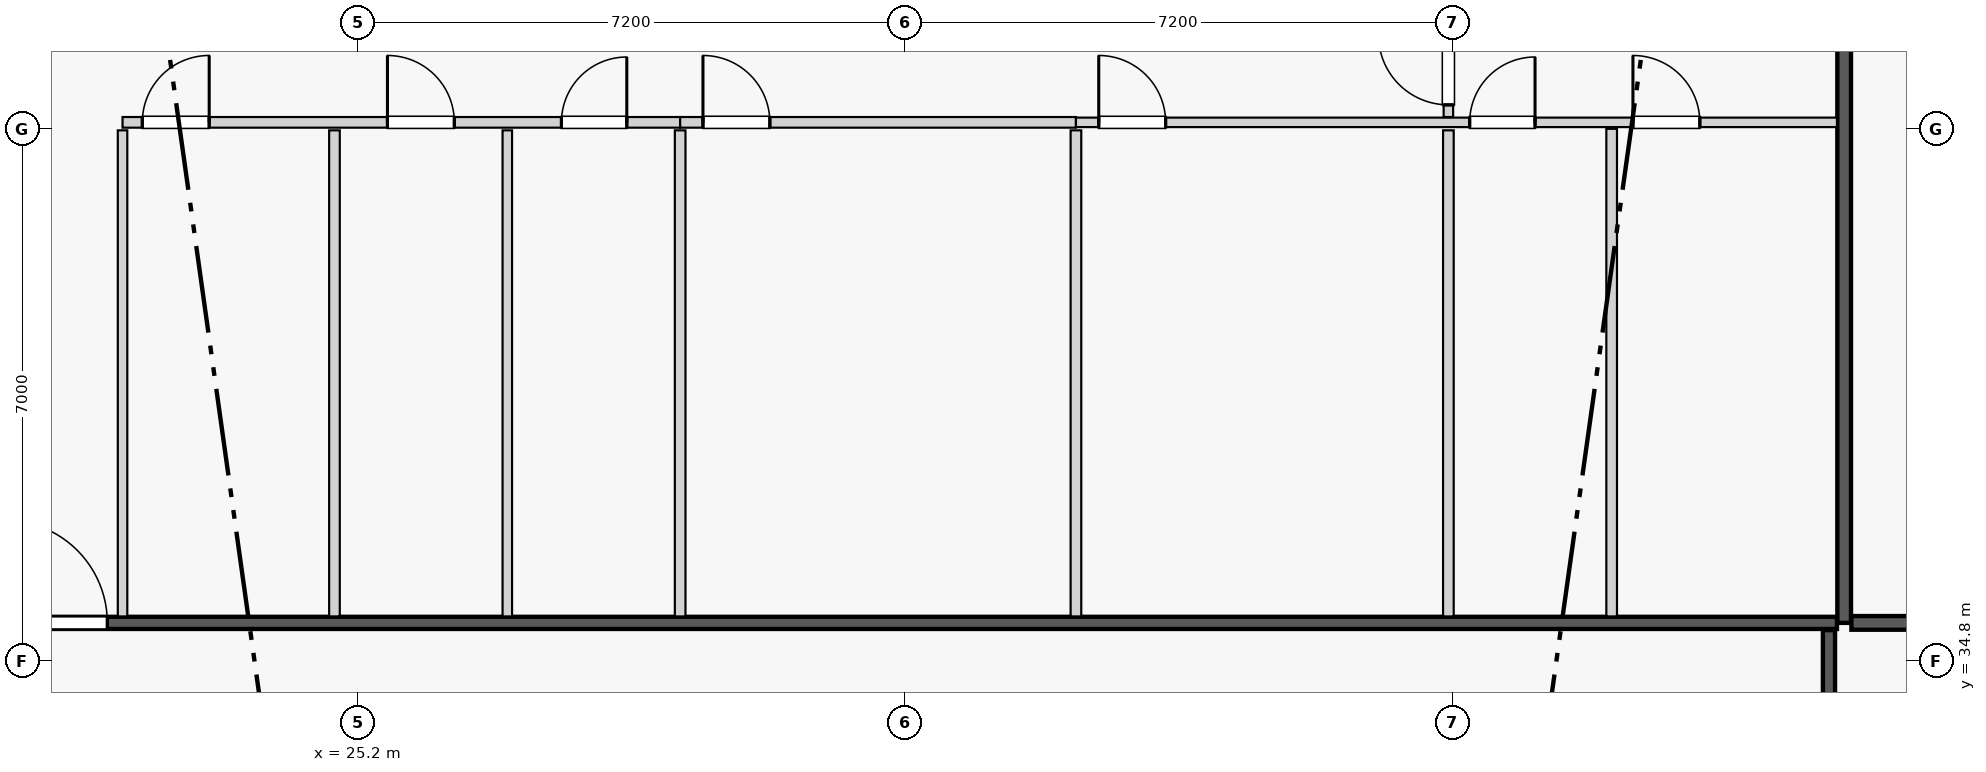
"""IFC4 building model, lengths in metres.
Left out: names, types, materials, properties, quantities, classifications, styles, units other than length and angle.
Written with IfcOpenShell. Run it as: python <this file> out.ifc"""

import sys

from ifc_helpers import new_model, si_unit, direction, frame, frame_2d, origin, place, context, subcontext, project, spatial, rectangle, extrude, element, fill, save


model = new_model("IFC4")
c1 = context("Model", 3, precision=1e-05, world=origin(), true_north=direction((0.0, 1.0)))
c2 = subcontext(c1, "Body", "Model", "MODEL_VIEW")
j1 = project(units=[si_unit("LENGTHUNIT", "METRE"), si_unit("PLANEANGLEUNIT", "RADIAN")], contexts=[c1])
p1 = place(None, origin())
s1 = spatial("IfcSite", under=j1, at=p1, CompositionType="ELEMENT")
p2 = place(p1, origin())
s2 = spatial("IfcBuilding", under=s1, at=p2, CompositionType="ELEMENT")
p3 = place(p2, frame((0.0, 0.0, 112.6)))
s3 = spatial("IfcBuildingStorey", under=s2, at=p3, CompositionType="ELEMENT", Elevation=112.6)
p4 = place(p3, frame((44.75, 35.3, 0.0), z_axis=(0.0, 0.0, 1.0), x_axis=(0.0, 1.0, 0.0)))
e1 = element("IfcWall", 1, at=p4, inside=s3, PredefinedType="PARTITIONING", context=c2, shape_type="SweptSolid", body=[
    extrude(rectangle(XDim=12.195, YDim=0.18, at=frame_2d((6.098, 0.0))), origin(), (0.0, 0.0, 1.0), 3.34),
])
p5 = place(p3, frame((20.145, 35.3, 0.0), z_axis=(0.0, 0.0, 1.0), x_axis=(1.0, 0.0, 0.0)))
e2 = element("IfcWall", 2, at=p5, inside=s3, PredefinedType="PARTITIONING", context=c2, shape_type="SweptSolid", body=[
    extrude(rectangle(XDim=24.51, YDim=0.16, at=frame_2d((12.255, 0.0))), origin(), (0.0, 0.0, 1.0), 3.34),
])
p6 = place(p5, frame((0.405, 0.0, 0.0)))
e3 = element("IfcOpeningElement", 3, at=p6, cuts=e2, PredefinedType="OPENING", context=c2, shape_type="SweptSolid", body=[
    extrude(rectangle(XDim=1.35, YDim=2.35, at=frame_2d((0.675, 1.175))), frame((0.0, 0.09, 0.0), z_axis=(0.0, -1.0, 0.0), x_axis=(1.0, 0.0, 0.0)), (0.0, 0.0, 1.0), 0.18),
])
p7 = place(p3, frame((22.1, 35.385, 0.0), z_axis=(0.0, 0.0, 1.0), x_axis=(0.0, 1.0, 0.0)))
e4 = element("IfcWall", 4, at=p7, inside=s3, PredefinedType="PARTITIONING", context=c2, shape_type="SweptSolid", body=[
    extrude(rectangle(XDim=6.395, YDim=0.125, at=frame_2d((3.198, 0.0))), origin(), (0.0, 0.0, 1.0), 2.722),
])
p8 = place(p3, frame((22.1, 41.885, 0.0), z_axis=(0.0, 0.0, 1.0), x_axis=(1.0, 0.0, 0.0)))
e5 = element("IfcWall", 5, at=p8, inside=s3, PredefinedType="PLUMBINGWALL", context=c2, shape_type="SweptSolid", body=[
    extrude(rectangle(XDim=7.336, YDim=0.14, at=frame_2d((3.668, 0.0))), origin(), (0.0, 0.0, 1.0), 3.34),
])
p9 = place(p8, frame((5.774, 0.0, 0.0)))
e6 = element("IfcOpeningElement", 6, at=p9, cuts=e5, PredefinedType="OPENING", context=c2, shape_type="SweptSolid", body=[
    extrude(rectangle(XDim=0.86, YDim=2.1, at=frame_2d((0.43, 1.05))), frame((0.0, 0.08, 0.0), z_axis=(0.0, -1.0, 0.0), x_axis=(1.0, 0.0, 0.0)), (0.0, 0.0, 1.0), 0.16),
])
p10 = place(p8, frame((0.26, 0.0, 0.0)))
e7 = element("IfcOpeningElement", 7, at=p10, cuts=e5, PredefinedType="OPENING", context=c2, shape_type="SweptSolid", body=[
    extrude(rectangle(XDim=0.88, YDim=2.15, at=frame_2d((0.44, 1.075))), frame((0.0, 0.08, 0.0), z_axis=(0.0, -1.0, 0.0), x_axis=(1.0, 0.0, 0.0)), (0.0, 0.0, 1.0), 0.16),
])
p11 = place(p8, frame((3.485, 0.0, 0.0)))
e8 = element("IfcOpeningElement", 8, at=p11, cuts=e5, PredefinedType="OPENING", context=c2, shape_type="SweptSolid", body=[
    extrude(rectangle(XDim=0.88, YDim=2.15, at=frame_2d((0.44, 1.075))), frame((0.0, 0.08, 0.0), z_axis=(0.0, -1.0, 0.0), x_axis=(1.0, 0.0, 0.0)), (0.0, 0.0, 1.0), 0.16),
])
p12 = place(p3, frame((29.436, 41.885, 0.0), z_axis=(0.0, 0.0, 1.0), x_axis=(1.0, 0.0, 0.0)))
e9 = element("IfcWall", 9, at=p12, inside=s3, PredefinedType="PLUMBINGWALL", context=c2, shape_type="SweptSolid", body=[
    extrude(rectangle(XDim=5.207, YDim=0.14, at=frame_2d((2.604, 0.0))), origin(), (0.0, 0.0, 1.0), 3.34),
])
p13 = place(p12, frame((0.3, 0.0, 0.0)))
e10 = element("IfcOpeningElement", 10, at=p13, cuts=e9, PredefinedType="OPENING", context=c2, shape_type="SweptSolid", body=[
    extrude(rectangle(XDim=0.88, YDim=2.15, at=frame_2d((0.44, 1.075))), frame((0.0, 0.08, 0.0), z_axis=(0.0, -1.0, 0.0), x_axis=(1.0, 0.0, 0.0)), (0.0, 0.0, 1.0), 0.16),
])
p14 = place(p3, frame((34.643, 41.885, 0.0), z_axis=(0.0, 0.0, 1.0), x_axis=(1.0, 0.0, 0.0)))
e11 = element("IfcWall", 11, at=p14, inside=s3, PredefinedType="PARTITIONING", context=c2, shape_type="SweptSolid", body=[
    extrude(rectangle(XDim=10.012, YDim=0.125, at=frame_2d((5.006, 0.0))), origin(), (0.0, 0.0, 1.0), 3.34),
])
p15 = place(p14, frame((5.18, 0.0, 0.0)))
e12 = element("IfcOpeningElement", 12, at=p15, cuts=e11, PredefinedType="OPENING", context=c2, shape_type="SweptSolid", body=[
    extrude(rectangle(XDim=0.86, YDim=2.1, at=frame_2d((0.43, 1.05))), frame((0.0, 0.073, 0.0), z_axis=(0.0, -1.0, 0.0), x_axis=(1.0, 0.0, 0.0)), (0.0, 0.0, 1.0), 0.145),
])
p16 = place(p14, frame((7.328, 0.0, 0.0)))
e13 = element("IfcOpeningElement", 13, at=p16, cuts=e11, PredefinedType="OPENING", context=c2, shape_type="SweptSolid", body=[
    extrude(rectangle(XDim=0.88, YDim=2.15, at=frame_2d((0.44, 1.075))), frame((0.0, 0.073, 0.0), z_axis=(0.0, -1.0, 0.0), x_axis=(1.0, 0.0, 0.0)), (0.0, 0.0, 1.0), 0.145),
])
p17 = place(p14, frame((0.3, 0.0, 0.0)))
e14 = element("IfcOpeningElement", 14, at=p17, cuts=e11, PredefinedType="OPENING", context=c2, shape_type="SweptSolid", body=[
    extrude(rectangle(XDim=0.88, YDim=2.15, at=frame_2d((0.44, 1.075))), frame((0.0, 0.073, 0.0), z_axis=(0.0, -1.0, 0.0), x_axis=(1.0, 0.0, 0.0)), (0.0, 0.0, 1.0), 0.145),
])
p18 = place(p3, frame((24.888, 35.385, 0.0), z_axis=(0.0, 0.0, 1.0), x_axis=(0.0, 1.0, 0.0)))
e15 = element("IfcWall", 15, at=p18, inside=s3, PredefinedType="PLUMBINGWALL", context=c2, shape_type="SweptSolid", body=[
    extrude(rectangle(XDim=6.395, YDim=0.14, at=frame_2d((3.198, 0.0))), origin(), (0.0, 0.0, 1.0), 3.34),
])
p19 = place(p3, frame((27.162, 35.385, 0.0), z_axis=(0.0, 0.0, 1.0), x_axis=(0.0, 1.0, 0.0)))
e16 = element("IfcWall", 16, at=p19, inside=s3, PredefinedType="PARTITIONING", context=c2, shape_type="SweptSolid", body=[
    extrude(rectangle(XDim=6.395, YDim=0.125, at=frame_2d((3.198, 0.0))), origin(), (0.0, 0.0, 1.0), 3.34),
])
p20 = place(p3, frame((39.543, 41.955, 0.0), z_axis=(0.0, 0.0, 1.0), x_axis=(0.0, 1.0, 0.0)))
e17 = element("IfcWall", 17, at=p20, inside=s3, PredefinedType="PARTITIONING", context=c2, shape_type="SweptSolid", body=[
    extrude(rectangle(XDim=1.33, YDim=0.125, at=frame_2d((0.665, 0.0))), origin(), (0.0, 0.0, 1.0), 3.34),
])
p21 = place(p20, frame((0.16, 0.0, 0.0)))
e18 = element("IfcOpeningElement", 18, at=p21, cuts=e17, PredefinedType="OPENING", context=c2, shape_type="SweptSolid", body=[
    extrude(rectangle(XDim=0.92, YDim=2.15, at=frame_2d((0.46, 1.075))), frame((0.0, 0.073, 0.0), z_axis=(0.0, -1.0, 0.0), x_axis=(1.0, 0.0, 0.0)), (0.0, 0.0, 1.0), 0.145),
])
for number, where, z_axis, x_axis in (
    (19, (29.436, 35.385, 0.0), (0.0, 0.0, 1.0), (0.0, 1.0, 0.0)),
    (20, (34.643, 35.385, 0.0), (0.0, 0.0, 1.0), (0.0, 1.0, 0.0)),
    (21, (39.543, 35.385, 0.0), (0.0, 0.0, 1.0), (0.0, 1.0, 0.0)),
):
    element("IfcWall", number, at=place(p3, frame(where, z_axis=z_axis, x_axis=x_axis)), inside=s3, PredefinedType="PLUMBINGWALL", context=c2, shape_type="SweptSolid", body=[
        extrude(rectangle(XDim=6.395, YDim=0.14, at=frame_2d((3.198, 0.0))), origin(), (0.0, 0.0, 1.0), 3.34),
    ])
p22 = place(p3, frame((41.691, 35.385, 0.0), z_axis=(0.0, 0.0, 1.0), x_axis=(0.0, 1.0, 0.0)))
e22 = element("IfcWall", 22, at=p22, inside=s3, PredefinedType="PLUMBINGWALL", context=c2, shape_type="SweptSolid", body=[
    extrude(rectangle(XDim=6.415, YDim=0.14, at=frame_2d((3.208, 0.0))), origin(), (0.0, 0.0, 1.0), 2.722),
])
p23 = place(p3, frame((44.845, 35.3, 0.0), z_axis=(0.0, 0.0, 1.0), x_axis=(1.0, 0.0, 0.0)))
e23 = element("IfcWall", 23, at=p23, inside=s3, PredefinedType="PARTITIONING", context=c2, shape_type="SweptSolid", body=[
    extrude(rectangle(XDim=7.669, YDim=0.18, at=frame_2d((3.834, 0.0))), origin(), (0.0, 0.0, 1.0), 3.34),
])
p24 = place(p3, frame((44.55, 16.595, 0.0), z_axis=(0.0, 0.0, 1.0), x_axis=(0.0, 1.0, 0.0)))
e24 = element("IfcWall", 24, at=p24, inside=s3, PredefinedType="PARTITIONING", context=c2, shape_type="SweptSolid", body=[
    extrude(rectangle(XDim=18.61, YDim=0.16, at=frame_2d((9.305, 0.0))), origin(), (0.0, 0.0, 1.0), 3.34),
])
p25 = place(p24, frame((0.45, 0.0, 0.0)))
e25 = element("IfcOpeningElement", 25, at=p25, cuts=e24, PredefinedType="OPENING", context=c2, shape_type="SweptSolid", body=[
    extrude(rectangle(XDim=1.02, YDim=2.25, at=frame_2d((0.51, 1.125))), frame((0.0, 0.09, 0.0), z_axis=(0.0, -1.0, 0.0), x_axis=(1.0, 0.0, 0.0)), (0.0, 0.0, 1.0), 0.18),
])
p26 = place(p9, origin())
e26 = element("IfcDoor", 26, at=p26, inside=s3, OperationType="SINGLE_SWING_RIGHT", PredefinedType="DOOR", context=c2, shape_type="SweptSolid", body=[
    extrude(rectangle(XDim=0.86, YDim=2.1, at=frame_2d((0.43, 1.05))), frame((0.0, 0.025, 0.0), z_axis=(0.0, -1.0, 0.0), x_axis=(1.0, 0.0, 0.0)), (0.0, 0.0, 1.0), 0.05),
])
fill(e6, e26)
p27 = place(p15, origin())
e27 = element("IfcDoor", 27, at=p27, inside=s3, OperationType="SINGLE_SWING_RIGHT", PredefinedType="DOOR", context=c2, shape_type="SweptSolid", body=[
    extrude(rectangle(XDim=0.86, YDim=2.1, at=frame_2d((0.43, 1.05))), frame((0.0, 0.025, 0.0), z_axis=(0.0, -1.0, 0.0), x_axis=(1.0, 0.0, 0.0)), (0.0, 0.0, 1.0), 0.05),
])
fill(e12, e27)
p28 = place(p16, origin())
e28 = element("IfcDoor", 28, at=p28, inside=s3, OperationType="SINGLE_SWING_LEFT", PredefinedType="DOOR", context=c2, shape_type="SweptSolid", body=[
    extrude(rectangle(XDim=0.88, YDim=2.15, at=frame_2d((0.44, 1.075))), frame((0.0, 0.025, 0.0), z_axis=(0.0, -1.0, 0.0), x_axis=(1.0, 0.0, 0.0)), (0.0, 0.0, 1.0), 0.05),
])
fill(e13, e28)
p29 = place(p6, origin())
e29 = element("IfcDoor", 29, at=p29, inside=s3, OperationType="SINGLE_SWING_LEFT", PredefinedType="DOOR", context=c2, shape_type="SweptSolid", body=[
    extrude(rectangle(XDim=1.35, YDim=2.35, at=frame_2d((0.675, 1.175))), frame((0.0, 0.025, 0.0), z_axis=(0.0, -1.0, 0.0), x_axis=(1.0, 0.0, 0.0)), (0.0, 0.0, 1.0), 0.05),
])
fill(e3, e29)
p30 = place(p10, origin())
e30 = element("IfcDoor", 30, at=p30, inside=s3, OperationType="SINGLE_SWING_RIGHT", PredefinedType="DOOR", context=c2, shape_type="SweptSolid", body=[
    extrude(rectangle(XDim=0.88, YDim=2.15, at=frame_2d((0.44, 1.075))), frame((0.0, 0.025, 0.0), z_axis=(0.0, -1.0, 0.0), x_axis=(1.0, 0.0, 0.0)), (0.0, 0.0, 1.0), 0.05),
])
fill(e7, e30)
p31 = place(p11, origin())
e31 = element("IfcDoor", 31, at=p31, inside=s3, OperationType="SINGLE_SWING_LEFT", PredefinedType="DOOR", context=c2, shape_type="SweptSolid", body=[
    extrude(rectangle(XDim=0.88, YDim=2.15, at=frame_2d((0.44, 1.075))), frame((0.0, 0.025, 0.0), z_axis=(0.0, -1.0, 0.0), x_axis=(1.0, 0.0, 0.0)), (0.0, 0.0, 1.0), 0.05),
])
fill(e8, e31)
p32 = place(p13, origin())
e32 = element("IfcDoor", 32, at=p32, inside=s3, OperationType="SINGLE_SWING_LEFT", PredefinedType="DOOR", context=c2, shape_type="SweptSolid", body=[
    extrude(rectangle(XDim=0.88, YDim=2.15, at=frame_2d((0.44, 1.075))), frame((0.0, 0.025, 0.0), z_axis=(0.0, -1.0, 0.0), x_axis=(1.0, 0.0, 0.0)), (0.0, 0.0, 1.0), 0.05),
])
fill(e10, e32)
p33 = place(p21, origin())
e33 = element("IfcDoor", 33, at=p33, inside=s3, OperationType="SINGLE_SWING_RIGHT", PredefinedType="DOOR", context=c2, shape_type="SweptSolid", body=[
    extrude(rectangle(XDim=0.92, YDim=2.15, at=frame_2d((0.46, 1.075))), frame((0.0, 0.025, 0.0), z_axis=(0.0, -1.0, 0.0), x_axis=(1.0, 0.0, 0.0)), (0.0, 0.0, 1.0), 0.05),
])
fill(e18, e33)
p34 = place(p17, origin())
e34 = element("IfcDoor", 34, at=p34, inside=s3, OperationType="SINGLE_SWING_LEFT", PredefinedType="DOOR", context=c2, shape_type="SweptSolid", body=[
    extrude(rectangle(XDim=0.88, YDim=2.15, at=frame_2d((0.44, 1.075))), frame((0.0, 0.025, 0.0), z_axis=(0.0, -1.0, 0.0), x_axis=(1.0, 0.0, 0.0)), (0.0, 0.0, 1.0), 0.05),
])
fill(e14, e34)
save(model, sys.argv[1])
